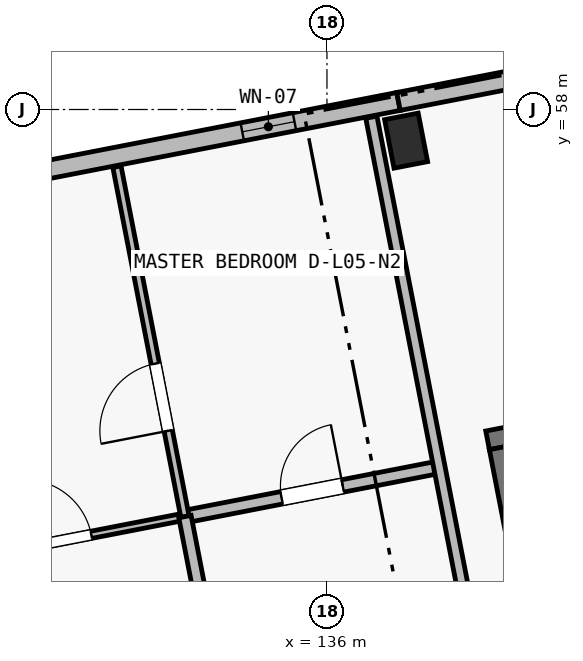
"""IFC4 building model, lengths in metres.
Left out: names, types, materials, properties, quantities, classifications, styles, units other than length and angle.
Written with IfcOpenShell. Run it as: python <this file> out.ifc"""

import sys

from ifc_helpers import new_model, si_unit, direction, frame, frame_2d, origin, origin_2d, place, context, subcontext, project, spatial, rectangle, extrude, element, fill, save


model = new_model("IFC4")
c1 = context("Model", 3, precision=1e-05, world=origin(), true_north=direction((0.0, 1.0)))
c2 = subcontext(c1, "Body", "Model", "MODEL_VIEW")
j1 = project(units=[si_unit("LENGTHUNIT", "METRE"), si_unit("PLANEANGLEUNIT", "RADIAN")], contexts=[c1])
p1 = place(None, origin())
s1 = spatial("IfcSite", under=j1, at=p1, CompositionType="ELEMENT")
p2 = place(p1, origin())
s2 = spatial("IfcBuilding", under=s1, at=p2, CompositionType="ELEMENT")
p3 = place(p2, frame((0.0, 0.0, 18.15)))
s3 = spatial("IfcBuildingStorey", under=s2, at=p3, CompositionType="ELEMENT", Elevation=18.15)
p4 = place(p3, frame((137.041, 57.59, 0.0), z_axis=(0.0, 0.0, 1.0), x_axis=(0.981627183448, 0.190808995377, 0.0)))
e1 = element("IfcColumn", 1, at=p4, inside=s3, PredefinedType="COLUMN", context=c2, shape_type="SweptSolid", body=[
    extrude(rectangle(XDim=0.45, YDim=0.65, at=origin_2d()), origin(), (0.0, 0.0, 1.0), 3.25),
])
p5 = place(p3, frame((138.113, 53.647, 0.0), z_axis=(0.0, 0.0, 1.0), x_axis=(0.981626097708, 0.19081458094, 0.0)))
e2 = element("IfcWall", 2, at=p5, inside=s3, PredefinedType="SHEAR", context=c2, shape_type="SweptSolid", body=[
    extrude(rectangle(XDim=7.0, YDim=0.25, at=frame_2d((3.5, 0.0))), origin(), (0.0, 0.0, 1.0), 3.25),
])
p6 = place(p5, frame((0.45, 0.0, 0.0)))
e3 = element("IfcOpeningElement", 3, at=p6, cuts=e2, PredefinedType="OPENING", context=c2, shape_type="SweptSolid", body=[
    extrude(rectangle(XDim=0.9, YDim=2.1, at=frame_2d((0.45, 1.05))), frame((0.0, 0.14, 0.0), z_axis=(0.0, -1.0, 0.0), x_axis=(1.0, 0.0, 0.0)), (0.0, 0.0, 1.0), 0.28),
])
p7 = place(p3, frame((138.804, 50.751, 0.0), z_axis=(0.0, 0.0, 1.0), x_axis=(-0.190858194834, 0.981617618762, 0.0)))
e4 = element("IfcWall", 4, at=p7, inside=s3, PredefinedType="SHEAR", context=c2, shape_type="SweptSolid", body=[
    extrude(rectangle(XDim=2.85, YDim=0.25, at=frame_2d((1.425, 0.0))), origin(), (0.0, 0.0, 1.0), 3.25),
])
p8 = place(p3, frame((129.481, 56.656, 0.0), z_axis=(0.0, 0.0, 1.0), x_axis=(0.981626422232, 0.190812911449, 0.0)))
e5 = element("IfcWall", 5, at=p8, inside=s3, PredefinedType="SOLIDWALL", context=c2, shape_type="SweptSolid", body=[
    extrude(rectangle(XDim=7.6, YDim=0.24, at=frame_2d((3.8, 0.0))), origin(), (0.0, 0.0, 1.0), 3.0),
])
p9 = place(p8, frame((0.934, 0.0, 0.5)))
e6 = element("IfcOpeningElement", 6, at=p9, cuts=e5, PredefinedType="OPENING", context=c2, shape_type="SweptSolid", body=[
    extrude(rectangle(XDim=0.62, YDim=2.28, at=frame_2d((0.31, 1.14))), frame((0.0, 0.135, 0.0), z_axis=(0.0, -1.0, 0.0), x_axis=(1.0, 0.0, 0.0)), (0.0, 0.0, 1.0), 0.27),
])
p10 = place(p8, frame((5.506, 0.0, 0.44)))
e7 = element("IfcOpeningElement", 7, at=p10, cuts=e5, PredefinedType="OPENING", context=c2, shape_type="SweptSolid", body=[
    extrude(rectangle(XDim=0.7, YDim=2.36, at=frame_2d((0.35, 1.18))), frame((0.0, 0.135, 0.0), z_axis=(0.0, -1.0, 0.0), x_axis=(1.0, 0.0, 0.0)), (0.0, 0.0, 1.0), 0.27),
])
p11 = place(p3, frame((136.941, 58.106, 0.0), z_axis=(0.0, 0.0, 1.0), x_axis=(0.981629832251, 0.190795367961, 0.0)))
e8 = element("IfcWall", 8, at=p11, inside=s3, PredefinedType="SOLIDWALL", context=c2, shape_type="SweptSolid", body=[
    extrude(rectangle(XDim=2.375, YDim=0.24, at=frame_2d((1.188, 0.0))), origin(), (0.0, 0.0, 1.0), 3.0),
])
p12 = place(p3, frame((130.784, 51.994, 0.0), z_axis=(0.0, 0.0, 1.0), x_axis=(0.981629173664, 0.190798756314, 0.0)))
e9 = element("IfcWall", 9, at=p12, inside=s3, PredefinedType="PARTITIONING", context=c2, shape_type="SweptSolid", body=[
    extrude(rectangle(XDim=3.41, YDim=0.095, at=frame_2d((1.705, 0.0))), origin(), (0.0, 0.0, 1.0), 2.97),
])
p13 = place(p12, frame((1.255, 0.0, 0.0)))
e10 = element("IfcOpeningElement", 10, at=p13, cuts=e9, PredefinedType="OPENING", context=c2, shape_type="SweptSolid", body=[
    extrude(rectangle(XDim=0.9, YDim=2.1, at=frame_2d((0.45, 1.05))), frame((0.0, 0.062, 0.0), z_axis=(0.0, -1.0, 0.0), x_axis=(1.0, 0.0, 0.0)), (0.0, 0.0, 1.0), 0.125),
])
p14 = place(p3, frame((134.132, 52.644, 0.0), z_axis=(0.0, 0.0, 1.0), x_axis=(0.981629173664, 0.190798756314, 0.0)))
e11 = element("IfcWall", 11, at=p14, inside=s3, PredefinedType="PLUMBINGWALL", context=c2, shape_type="SweptSolid", body=[
    extrude(rectangle(XDim=3.41, YDim=0.165, at=frame_2d((1.705, 0.0))), origin(), (0.0, 0.0, 1.0), 2.97),
])
p15 = place(p14, frame((1.295, 0.0, 0.0)))
e12 = element("IfcOpeningElement", 12, at=p15, cuts=e11, PredefinedType="OPENING", context=c2, shape_type="SweptSolid", body=[
    extrude(rectangle(XDim=0.82, YDim=2.08, at=frame_2d((0.41, 1.04))), frame((0.0, 0.097, 0.0), z_axis=(0.0, -1.0, 0.0), x_axis=(1.0, 0.0, 0.0)), (0.0, 0.0, 1.0), 0.195),
])
p16 = place(p3, frame((134.132, 52.644, 0.0), z_axis=(0.0, 0.0, 1.0), x_axis=(-0.190837612577, 0.981621620394, 0.0)))
e13 = element("IfcWall", 13, at=p16, inside=s3, PredefinedType="PARTITIONING", context=c2, shape_type="SweptSolid", body=[
    extrude(rectangle(XDim=4.69, YDim=0.11, at=frame_2d((2.345, 0.0))), origin(), (0.0, 0.0, 1.0), 2.97),
])
p17 = place(p16, frame((1.15, 0.0, 0.0)))
e14 = element("IfcOpeningElement", 14, at=p17, cuts=e13, PredefinedType="OPENING", context=c2, shape_type="SweptSolid", body=[
    extrude(rectangle(XDim=0.9, YDim=2.1, at=frame_2d((0.45, 1.05))), frame((0.0, 0.07, 0.0), z_axis=(0.0, -1.0, 0.0), x_axis=(1.0, 0.0, 0.0)), (0.0, 0.0, 1.0), 0.14),
])
p18 = place(p3, frame((135.12, 47.559, 0.0), z_axis=(0.0, 0.0, 1.0), x_axis=(-0.190783877533, 0.981632065528, 0.0)))
e15 = element("IfcWall", 15, at=p18, inside=s3, PredefinedType="PLUMBINGWALL", context=c2, shape_type="SweptSolid", body=[
    extrude(rectangle(XDim=5.18, YDim=0.165, at=frame_2d((2.59, 0.0))), origin(), (0.0, 0.0, 1.0), 2.97),
])
p19 = place(p3, frame((138.467, 48.21, 0.0), z_axis=(0.0, 0.0, 1.0), x_axis=(-0.190814044018, 0.981626202078, 0.0)))
e16 = element("IfcWall", 16, at=p19, inside=s3, PredefinedType="PARTITIONING", context=c2, shape_type="SweptSolid", body=[
    extrude(rectangle(XDim=9.87, YDim=0.15, at=frame_2d((4.935, 0.0))), origin(), (0.0, 0.0, 1.0), 2.97),
])
p20 = place(p10, origin())
e17 = element("IfcWindow", 17, at=p20, inside=s3, PartitioningType="SINGLE_PANEL", PredefinedType="WINDOW", context=c2, shape_type="SweptSolid", body=[
    extrude(rectangle(XDim=0.7, YDim=2.36, at=frame_2d((0.35, 1.18))), frame((0.0, 0.03, 0.0), z_axis=(0.0, -1.0, 0.0), x_axis=(1.0, 0.0, 0.0)), (0.0, 0.0, 1.0), 0.06),
])
fill(e7, e17)
p21 = place(p13, origin())
e18 = element("IfcDoor", 18, at=p21, inside=s3, OperationType="SINGLE_SWING_LEFT", PredefinedType="DOOR", context=c2, shape_type="SweptSolid", body=[
    extrude(rectangle(XDim=0.9, YDim=2.1, at=frame_2d((0.45, 1.05))), frame((0.0, 0.025, 0.0), z_axis=(0.0, -1.0, 0.0), x_axis=(1.0, 0.0, 0.0)), (0.0, 0.0, 1.0), 0.05),
])
fill(e10, e18)
p22 = place(p15, origin())
e19 = element("IfcDoor", 19, at=p22, inside=s3, OperationType="SINGLE_SWING_RIGHT", PredefinedType="DOOR", context=c2, shape_type="SweptSolid", body=[
    extrude(rectangle(XDim=0.82, YDim=2.08, at=frame_2d((0.41, 1.04))), frame((0.0, 0.025, 0.0), z_axis=(0.0, -1.0, 0.0), x_axis=(1.0, 0.0, 0.0)), (0.0, 0.0, 1.0), 0.05),
])
fill(e12, e19)
p23 = place(p17, origin())
e20 = element("IfcDoor", 20, at=p23, inside=s3, OperationType="SINGLE_SWING_LEFT", PredefinedType="DOOR", context=c2, shape_type="SweptSolid", body=[
    extrude(rectangle(XDim=0.9, YDim=2.1, at=frame_2d((0.45, 1.05))), frame((0.0, 0.025, 0.0), z_axis=(0.0, -1.0, 0.0), x_axis=(1.0, 0.0, 0.0)), (0.0, 0.0, 1.0), 0.05),
])
fill(e14, e20)
save(model, sys.argv[1])
